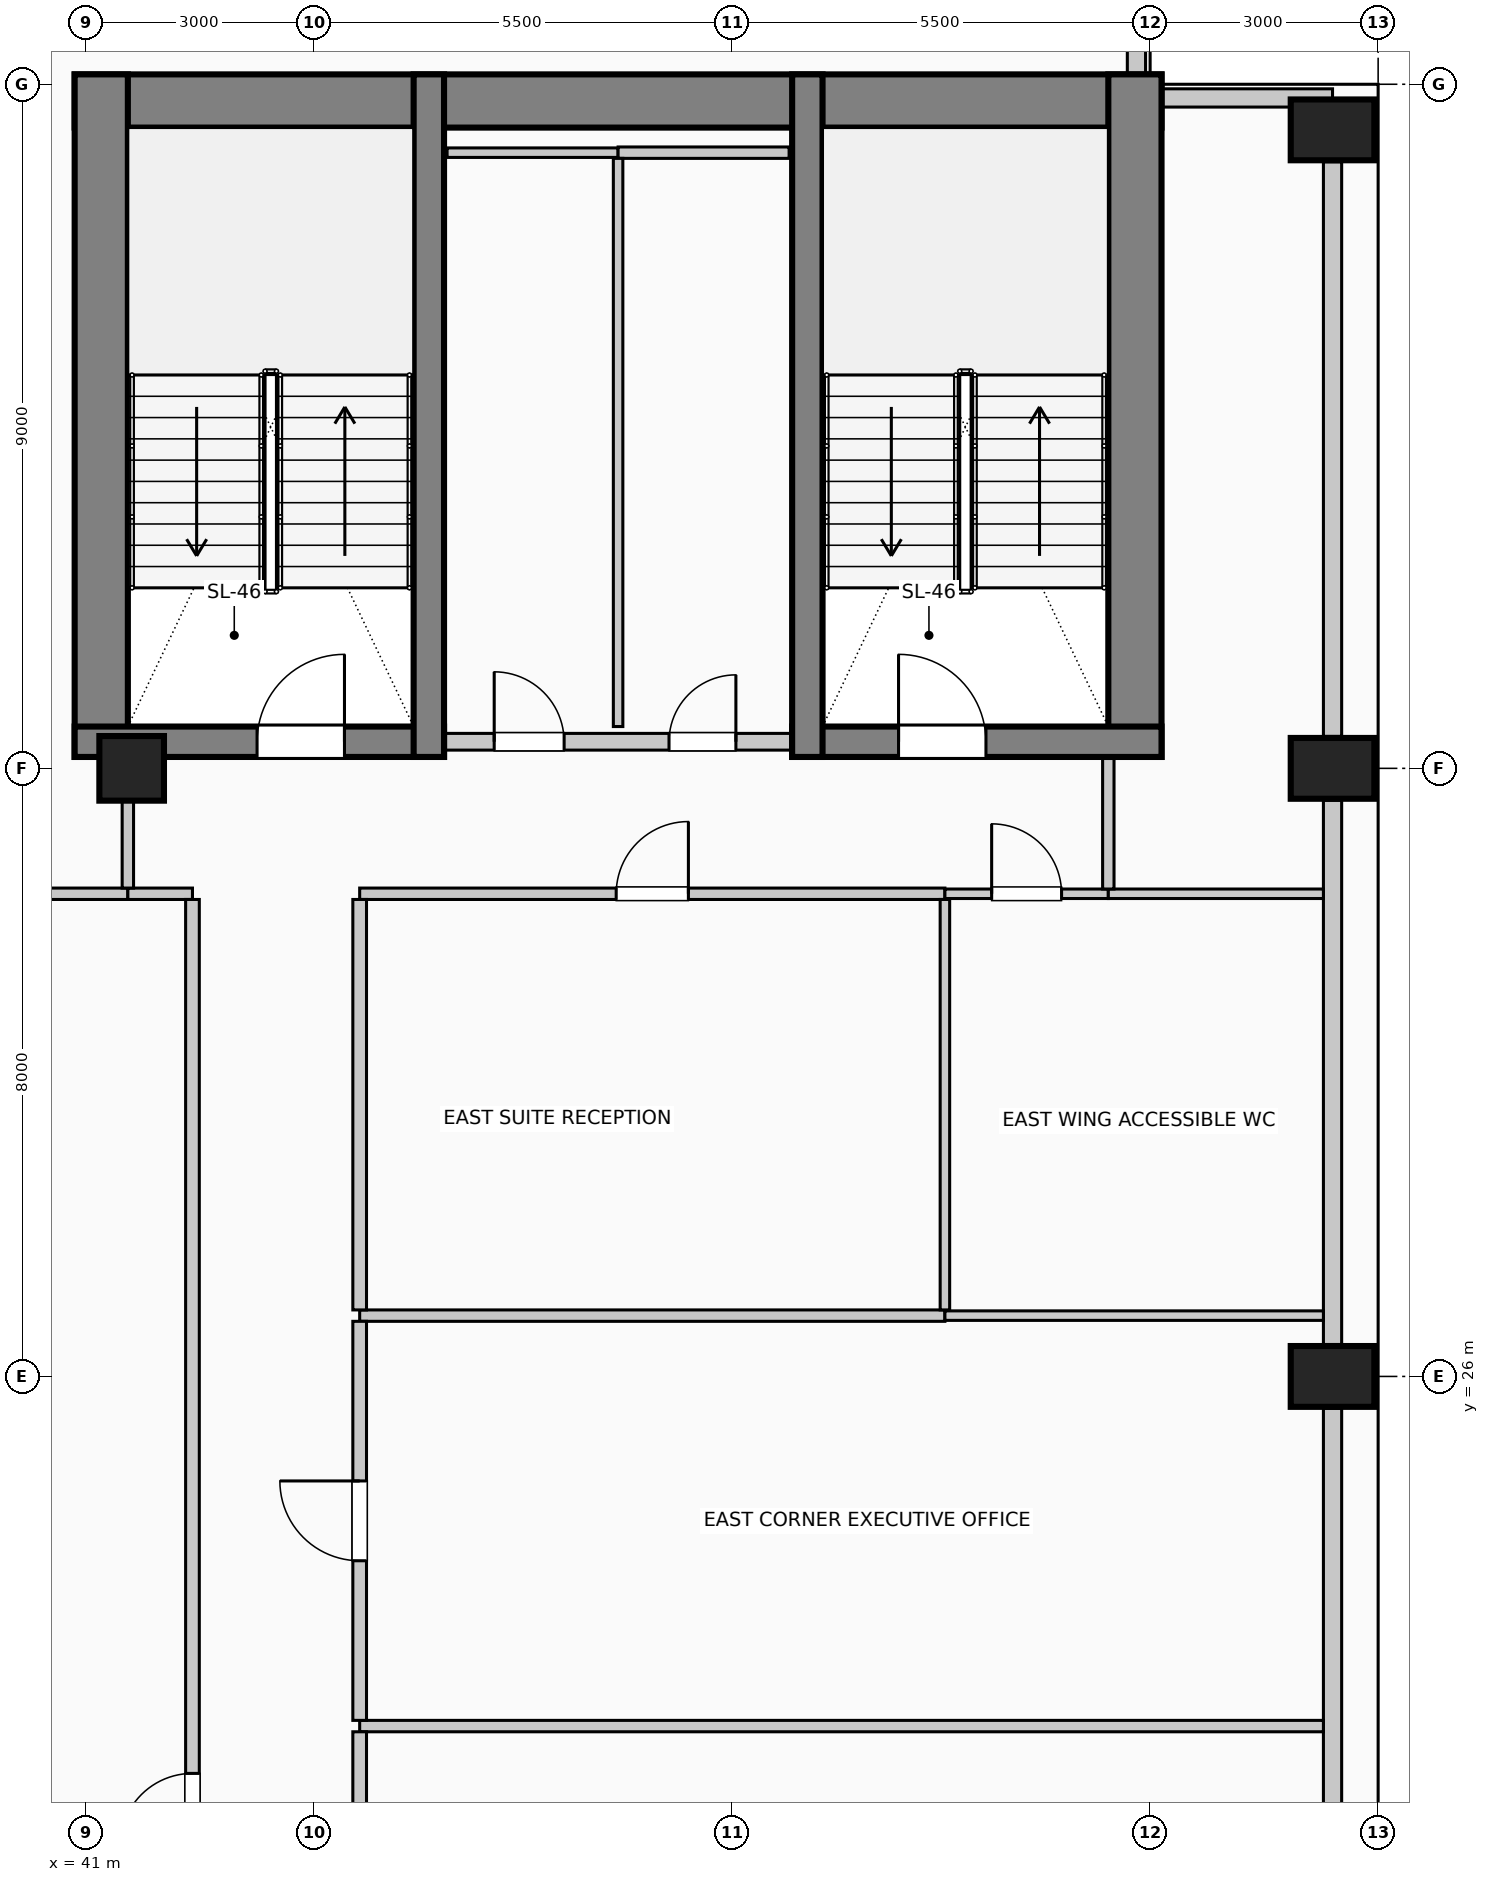
"""IFC4 building model, lengths in metres.
Left out: names, types, materials, properties, quantities, classifications, styles, units other than length and angle.
Written with IfcOpenShell. Run it as: python <this file> out.ifc"""

import sys

from ifc_helpers import new_model, si_unit, direction, frame, frame_2d, origin, origin_2d, place, context, subcontext, project, spatial, rectangle, circle, extrude, element, fill, save


model = new_model("IFC4")
c1 = context("Model", 3, precision=1e-05, world=origin(), true_north=direction((0.0, 1.0)))
c2 = subcontext(c1, "Body", "Model", "MODEL_VIEW")
j1 = project(units=[si_unit("LENGTHUNIT", "METRE"), si_unit("PLANEANGLEUNIT", "RADIAN")], contexts=[c1])
p1 = place(None, origin())
s1 = spatial("IfcSite", under=j1, at=p1, CompositionType="ELEMENT")
p2 = place(p1, origin())
s2 = spatial("IfcBuilding", under=s1, at=p2, CompositionType="ELEMENT")
p3 = place(p2, frame((0.0, 0.0, 182.6)))
s3 = spatial("IfcBuildingStorey", under=s2, at=p3, CompositionType="ELEMENT", Elevation=182.6)
p4 = place(p3, frame((40.85, 42.78, 0.0), z_axis=(0.0, 0.0, 1.0), x_axis=(1.0, 0.0, 0.0)))
e1 = element("IfcWall", 1, at=p4, inside=s3, PredefinedType="SHEAR", context=c2, shape_type="SweptSolid", body=[
    extrude(rectangle(XDim=14.3, YDim=0.7, at=frame_2d((7.15, 0.0))), origin(), (0.0, 0.0, 1.0), 4.0),
])
for number, where, z_axis, x_axis in (
    (2, (41.2, 34.15, 0.0), (0.0, 0.0, 1.0), (0.0, 1.0, 0.0)),
    (3, (54.8, 34.15, 0.0), (0.0, 0.0, 1.0), (0.0, 1.0, 0.0)),
):
    element("IfcWall", number, at=place(p3, frame(where, z_axis=z_axis, x_axis=x_axis)), inside=s3, PredefinedType="SHEAR", context=c2, shape_type="SweptSolid", body=[
        extrude(rectangle(XDim=8.98, YDim=0.7, at=frame_2d((4.49, 0.0))), origin(), (0.0, 0.0, 1.0), 4.0),
    ])
p5 = place(p3, frame((40.85, 34.35, 0.0), z_axis=(0.0, 0.0, 1.0), x_axis=(1.0, 0.0, 0.0)))
e4 = element("IfcWall", 4, at=p5, inside=s3, PredefinedType="SHEAR", context=c2, shape_type="SweptSolid", body=[
    extrude(rectangle(XDim=4.86, YDim=0.4, at=frame_2d((2.43, 0.0))), origin(), (0.0, 0.0, 1.0), 4.0),
])
p6 = place(p5, frame((2.4, 0.0, 0.0)))
e5 = element("IfcOpeningElement", 5, at=p6, cuts=e4, PredefinedType="OPENING", context=c2, shape_type="SweptSolid", body=[
    extrude(rectangle(XDim=1.15, YDim=2.2, at=frame_2d((0.575, 1.1))), frame((0.0, 0.21, 0.0), z_axis=(0.0, -1.0, 0.0), x_axis=(1.0, 0.0, 0.0)), (0.0, 0.0, 1.0), 0.42),
])
p7 = place(p3, frame((45.51, 34.15, 0.0), z_axis=(0.0, 0.0, 1.0), x_axis=(0.0, 1.0, 0.0)))
e6 = element("IfcWall", 6, at=p7, inside=s3, PredefinedType="SHEAR", context=c2, shape_type="SweptSolid", body=[
    extrude(rectangle(XDim=8.98, YDim=0.4, at=frame_2d((4.49, 0.0))), origin(), (0.0, 0.0, 1.0), 4.0),
])
p8 = place(p3, frame((50.29, 34.35, 0.0), z_axis=(0.0, 0.0, 1.0), x_axis=(1.0, 0.0, 0.0)))
e7 = element("IfcWall", 7, at=p8, inside=s3, PredefinedType="SHEAR", context=c2, shape_type="SweptSolid", body=[
    extrude(rectangle(XDim=4.86, YDim=0.4, at=frame_2d((2.43, 0.0))), origin(), (0.0, 0.0, 1.0), 4.0),
])
p9 = place(p8, frame((1.4, 0.0, 0.0)))
e8 = element("IfcOpeningElement", 8, at=p9, cuts=e7, PredefinedType="OPENING", context=c2, shape_type="SweptSolid", body=[
    extrude(rectangle(XDim=1.15, YDim=2.2, at=frame_2d((0.575, 1.1))), frame((0.0, 0.21, 0.0), z_axis=(0.0, -1.0, 0.0), x_axis=(1.0, 0.0, 0.0)), (0.0, 0.0, 1.0), 0.42),
])
p10 = place(p3, frame((50.49, 34.15, 0.0), z_axis=(0.0, 0.0, 1.0), x_axis=(0.0, 1.0, 0.0)))
e9 = element("IfcWall", 9, at=p10, inside=s3, PredefinedType="SHEAR", context=c2, shape_type="SweptSolid", body=[
    extrude(rectangle(XDim=8.98, YDim=0.4, at=frame_2d((4.49, 0.0))), origin(), (0.0, 0.0, 1.0), 4.0),
])
for number, where, z_axis, x_axis in (
    (10, (57.4, 26.0, 0.0), (0.0, 0.0, 1.0), (0.0, 1.0, 0.0)),
    (11, (57.4, 34.0, 0.0), (0.0, 0.0, 1.0), (0.0, 1.0, 0.0)),
    (12, (57.4, 42.4, 0.0), (0.0, 0.0, 1.0), (0.0, 1.0, 0.0)),
):
    element("IfcColumn", number, at=place(p3, frame(where, z_axis=z_axis, x_axis=x_axis)), inside=s3, PredefinedType="COLUMN", context=c2, shape_type="SweptSolid", body=[
        extrude(rectangle(XDim=0.8, YDim=1.1, at=origin_2d()), origin(), (0.0, 0.0, 1.0), 4.0),
    ])
p11 = place(p3, frame((41.6, 34.0, 0.0), z_axis=(0.0, 0.0, 1.0), x_axis=(1.0, 0.0, 0.0)))
e13 = element("IfcColumn", 13, at=p11, inside=s3, PredefinedType="COLUMN", context=c2, shape_type="SweptSolid", body=[
    extrude(circle(Radius=0.425, at=origin_2d()), origin(), (0.0, 0.0, 1.0), 4.0),
])
for number, where, z_axis, x_axis in (
    (14, (57.4, 25.58, 0.0), (0.0, 0.0, 1.0), (0.0, -1.0, 0.0)),
    (15, (57.4, 33.58, 0.0), (0.0, 0.0, 1.0), (0.0, -1.0, 0.0)),
):
    element("IfcWall", number, at=place(p3, frame(where, z_axis=z_axis, x_axis=x_axis)), inside=s3, PredefinedType="SOLIDWALL", context=c2, shape_type="SweptSolid", body=[
        extrude(rectangle(XDim=7.16, YDim=0.24, at=frame_2d((3.58, 0.0))), origin(), (0.0, 0.0, 1.0), 3.0),
    ])
p12 = place(p3, frame((57.4, 41.98, 0.0), z_axis=(0.0, 0.0, 1.0), x_axis=(0.0, -1.0, 0.0)))
e16 = element("IfcWall", 16, at=p12, inside=s3, PredefinedType="SOLIDWALL", context=c2, shape_type="SweptSolid", body=[
    extrude(rectangle(XDim=7.56, YDim=0.24, at=frame_2d((3.78, 0.0))), origin(), (0.0, 0.0, 1.0), 3.0),
])
p13 = place(p3, frame((54.82, 45.4, 0.0), z_axis=(0.0, 0.0, 1.0), x_axis=(0.0, -1.0, 0.0)))
e17 = element("IfcWall", 17, at=p13, inside=s3, PredefinedType="SOLIDWALL", context=c2, shape_type="SweptSolid", body=[
    extrude(rectangle(XDim=2.265, YDim=0.24, at=frame_2d((1.132, 0.0))), origin(), (0.0, 0.0, 1.0), 3.75),
])
p14 = place(p3, frame((55.155, 42.82, 0.0), z_axis=(0.0, 0.0, 1.0), x_axis=(1.0, 0.0, 0.0)))
e18 = element("IfcWall", 18, at=p14, inside=s3, PredefinedType="SOLIDWALL", context=c2, shape_type="SweptSolid", body=[
    extrude(rectangle(XDim=2.245, YDim=0.24, at=frame_2d((1.123, 0.0))), origin(), (0.0, 0.0, 1.0), 3.75),
])
p15 = place(p3, frame((45.72, 34.35, 0.0), z_axis=(0.0, 0.0, 1.0), x_axis=(1.0, 0.0, 0.0)))
e19 = element("IfcWall", 19, at=p15, inside=s3, PredefinedType="PARTITIONING", context=c2, shape_type="SweptSolid", body=[
    extrude(rectangle(XDim=4.56, YDim=0.22, at=frame_2d((2.28, 0.0))), origin(), (0.0, 0.0, 1.0), 3.75),
])
p16 = place(p15, frame((0.65, 0.0, 0.0)))
e20 = element("IfcOpeningElement", 20, at=p16, cuts=e19, PredefinedType="OPENING", context=c2, shape_type="SweptSolid", body=[
    extrude(rectangle(XDim=0.92, YDim=2.1, at=frame_2d((0.46, 1.05))), frame((0.0, 0.12, 0.0), z_axis=(0.0, -1.0, 0.0), x_axis=(1.0, 0.0, 0.0)), (0.0, 0.0, 1.0), 0.24),
])
p17 = place(p15, frame((2.95, 0.0, 0.0)))
e21 = element("IfcOpeningElement", 21, at=p17, cuts=e19, PredefinedType="OPENING", context=c2, shape_type="SweptSolid", body=[
    extrude(rectangle(XDim=0.88, YDim=2.1, at=frame_2d((0.44, 1.05))), frame((0.0, 0.12, 0.0), z_axis=(0.0, -1.0, 0.0), x_axis=(1.0, 0.0, 0.0)), (0.0, 0.0, 1.0), 0.24),
])
p18 = place(p3, frame((44.6, 21.4, 0.0), z_axis=(0.0, 0.0, 1.0), x_axis=(1.0, 0.0, 0.0)))
e22 = element("IfcWall", 22, at=p18, inside=s3, PredefinedType="PARTITIONING", context=c2, shape_type="SweptSolid", body=[
    extrude(rectangle(XDim=12.68, YDim=0.15, at=frame_2d((6.34, 0.0))), origin(), (0.0, 0.0, 1.0), 3.75),
])
p19 = place(p3, frame((44.6, 26.8, 0.0), z_axis=(0.0, 0.0, 1.0), x_axis=(1.0, 0.0, 0.0)))
e23 = element("IfcWall", 23, at=p19, inside=s3, PredefinedType="PARTITIONING", context=c2, shape_type="SweptSolid", body=[
    extrude(rectangle(XDim=7.7, YDim=0.15, at=frame_2d((3.85, 0.0))), origin(), (0.0, 0.0, 1.0), 3.75),
])
p20 = place(p3, frame((52.3, 26.8, 0.0), z_axis=(0.0, 0.0, 1.0), x_axis=(1.0, 0.0, 0.0)))
e24 = element("IfcWall", 24, at=p20, inside=s3, PredefinedType="PARTITIONING", context=c2, shape_type="SweptSolid", body=[
    extrude(rectangle(XDim=4.98, YDim=0.125, at=frame_2d((2.49, 0.0))), origin(), (0.0, 0.0, 1.0), 3.75),
])
p21 = place(p3, frame((34.12, 32.35, 0.0), z_axis=(0.0, 0.0, 1.0), x_axis=(1.0, 0.0, 0.0)))
e25 = element("IfcWall", 25, at=p21, inside=s3, PredefinedType="PARTITIONING", context=c2, shape_type="SweptSolid", body=[
    extrude(rectangle(XDim=7.43, YDim=0.15, at=frame_2d((3.715, 0.0))), origin(), (0.0, 0.0, 1.0), 3.75),
])
p22 = place(p3, frame((41.55, 32.35, 0.0), z_axis=(0.0, 0.0, 1.0), x_axis=(1.0, 0.0, 0.0)))
e26 = element("IfcWall", 26, at=p22, inside=s3, PredefinedType="PARTITIONING", context=c2, shape_type="SweptSolid", body=[
    extrude(rectangle(XDim=0.85, YDim=0.15, at=frame_2d((0.425, 0.0))), origin(), (0.0, 0.0, 1.0), 3.75),
])
p23 = place(p3, frame((44.6, 32.35, 0.0), z_axis=(0.0, 0.0, 1.0), x_axis=(1.0, 0.0, 0.0)))
e27 = element("IfcWall", 27, at=p23, inside=s3, PredefinedType="PARTITIONING", context=c2, shape_type="SweptSolid", body=[
    extrude(rectangle(XDim=7.7, YDim=0.15, at=frame_2d((3.85, 0.0))), origin(), (0.0, 0.0, 1.0), 3.75),
])
p24 = place(p23, frame((3.375, 0.0, 0.0)))
e28 = element("IfcOpeningElement", 28, at=p24, cuts=e27, PredefinedType="OPENING", context=c2, shape_type="SweptSolid", body=[
    extrude(rectangle(XDim=0.95, YDim=2.15, at=frame_2d((0.475, 1.075))), frame((0.0, 0.085, 0.0), z_axis=(0.0, -1.0, 0.0), x_axis=(1.0, 0.0, 0.0)), (0.0, 0.0, 1.0), 0.17),
])
p25 = place(p3, frame((52.3, 32.35, 0.0), z_axis=(0.0, 0.0, 1.0), x_axis=(1.0, 0.0, 0.0)))
e29 = element("IfcWall", 29, at=p25, inside=s3, PredefinedType="PARTITIONING", context=c2, shape_type="SweptSolid", body=[
    extrude(rectangle(XDim=2.15, YDim=0.125, at=frame_2d((1.075, 0.0))), origin(), (0.0, 0.0, 1.0), 3.75),
])
p26 = place(p25, frame((0.615, 0.0, 0.0)))
e30 = element("IfcOpeningElement", 30, at=p26, cuts=e29, PredefinedType="OPENING", context=c2, shape_type="SweptSolid", body=[
    extrude(rectangle(XDim=0.92, YDim=2.1, at=frame_2d((0.46, 1.05))), frame((0.0, 0.073, 0.0), z_axis=(0.0, -1.0, 0.0), x_axis=(1.0, 0.0, 0.0)), (0.0, 0.0, 1.0), 0.145),
])
p27 = place(p3, frame((54.45, 32.35, 0.0), z_axis=(0.0, 0.0, 1.0), x_axis=(1.0, 0.0, 0.0)))
e31 = element("IfcWall", 31, at=p27, inside=s3, PredefinedType="PARTITIONING", context=c2, shape_type="SweptSolid", body=[
    extrude(rectangle(XDim=2.83, YDim=0.125, at=frame_2d((1.415, 0.0))), origin(), (0.0, 0.0, 1.0), 3.75),
])
p28 = place(p3, frame((45.75, 42.1, 0.0), z_axis=(0.0, 0.0, 1.0), x_axis=(1.0, 0.0, 0.0)))
e32 = element("IfcWall", 32, at=p28, inside=s3, PredefinedType="PARTITIONING", context=c2, shape_type="SweptSolid", body=[
    extrude(rectangle(XDim=2.25, YDim=0.125, at=frame_2d((1.125, 0.0))), origin(), (0.0, 0.0, 1.0), 3.75),
])
p29 = place(p3, frame((48.0, 42.1, 0.0), z_axis=(0.0, 0.0, 1.0), x_axis=(1.0, 0.0, 0.0)))
e33 = element("IfcWall", 33, at=p29, inside=s3, PredefinedType="PARTITIONING", context=c2, shape_type="SweptSolid", body=[
    extrude(rectangle(XDim=2.25, YDim=0.15, at=frame_2d((1.125, 0.0))), origin(), (0.0, 0.0, 1.0), 3.75),
])
p30 = place(p3, frame((41.55, 32.425, 0.0), z_axis=(0.0, 0.0, 1.0), x_axis=(0.0, 1.0, 0.0)))
e34 = element("IfcWall", 34, at=p30, inside=s3, PredefinedType="PARTITIONING", context=c2, shape_type="SweptSolid", body=[
    extrude(rectangle(XDim=1.15, YDim=0.15, at=frame_2d((0.575, 0.0))), origin(), (0.0, 0.0, 1.0), 3.145),
])
p31 = place(p3, frame((42.4, 6.89, 0.0), z_axis=(0.0, 0.0, 1.0), x_axis=(0.0, 1.0, 0.0)))
e35 = element("IfcWall", 35, at=p31, inside=s3, PredefinedType="PARTITIONING", context=c2, shape_type="SweptSolid", body=[
    extrude(rectangle(XDim=25.385, YDim=0.18, at=frame_2d((12.692, 0.0))), origin(), (0.0, 0.0, 1.0), 3.75),
])
p32 = place(p31, frame((12.938, 0.0, 0.0)))
e36 = element("IfcOpeningElement", 36, at=p32, cuts=e35, PredefinedType="OPENING", context=c2, shape_type="SweptSolid", body=[
    extrude(rectangle(XDim=0.95, YDim=2.15, at=frame_2d((0.475, 1.075))), frame((0.0, 0.1, 0.0), z_axis=(0.0, -1.0, 0.0), x_axis=(1.0, 0.0, 0.0)), (0.0, 0.0, 1.0), 0.2),
])
p33 = place(p3, frame((44.6, 16.075, 0.0), z_axis=(0.0, 0.0, 1.0), x_axis=(0.0, 1.0, 0.0)))
e37 = element("IfcWall", 37, at=p33, inside=s3, PredefinedType="PARTITIONING", context=c2, shape_type="SweptSolid", body=[
    extrude(rectangle(XDim=5.25, YDim=0.18, at=frame_2d((2.625, 0.0))), origin(), (0.0, 0.0, 1.0), 3.75),
])
p34 = place(p33, frame((2.15, 0.0, 0.0)))
e38 = element("IfcOpeningElement", 38, at=p34, cuts=e37, PredefinedType="OPENING", context=c2, shape_type="SweptSolid", body=[
    extrude(rectangle(XDim=0.95, YDim=2.15, at=frame_2d((0.475, 1.075))), frame((0.0, 0.1, 0.0), z_axis=(0.0, -1.0, 0.0), x_axis=(1.0, 0.0, 0.0)), (0.0, 0.0, 1.0), 0.2),
])
p35 = place(p3, frame((44.6, 21.475, 0.0), z_axis=(0.0, 0.0, 1.0), x_axis=(0.0, 1.0, 0.0)))
e39 = element("IfcWall", 39, at=p35, inside=s3, PredefinedType="PARTITIONING", context=c2, shape_type="SweptSolid", body=[
    extrude(rectangle(XDim=5.25, YDim=0.18, at=frame_2d((2.625, 0.0))), origin(), (0.0, 0.0, 1.0), 3.75),
])
p36 = place(p35, frame((2.1, 0.0, 0.0)))
e40 = element("IfcOpeningElement", 40, at=p36, cuts=e39, PredefinedType="OPENING", context=c2, shape_type="SweptSolid", body=[
    extrude(rectangle(XDim=1.05, YDim=2.15, at=frame_2d((0.525, 1.075))), frame((0.0, 0.1, 0.0), z_axis=(0.0, -1.0, 0.0), x_axis=(1.0, 0.0, 0.0)), (0.0, 0.0, 1.0), 0.2),
])
p37 = place(p3, frame((44.6, 26.875, 0.0), z_axis=(0.0, 0.0, 1.0), x_axis=(0.0, 1.0, 0.0)))
e41 = element("IfcWall", 41, at=p37, inside=s3, PredefinedType="PARTITIONING", context=c2, shape_type="SweptSolid", body=[
    extrude(rectangle(XDim=5.4, YDim=0.18, at=frame_2d((2.7, 0.0))), origin(), (0.0, 0.0, 1.0), 3.75),
])
p38 = place(p3, frame((48.0, 34.55, 0.0), z_axis=(0.0, 0.0, 1.0), x_axis=(0.0, 1.0, 0.0)))
e42 = element("IfcWall", 42, at=p38, inside=s3, PredefinedType="PARTITIONING", context=c2, shape_type="SweptSolid", body=[
    extrude(rectangle(XDim=7.475, YDim=0.125, at=frame_2d((3.737, 0.0))), origin(), (0.0, 0.0, 1.0), 3.75),
])
p39 = place(p3, frame((52.3, 26.875, 0.0), z_axis=(0.0, 0.0, 1.0), x_axis=(0.0, 1.0, 0.0)))
e43 = element("IfcWall", 43, at=p39, inside=s3, PredefinedType="PARTITIONING", context=c2, shape_type="SweptSolid", body=[
    extrude(rectangle(XDim=5.4, YDim=0.125, at=frame_2d((2.7, 0.0))), origin(), (0.0, 0.0, 1.0), 3.75),
])
p40 = place(p3, frame((54.45, 32.413, 0.0), z_axis=(0.0, 0.0, 1.0), x_axis=(0.0, 1.0, 0.0)))
e44 = element("IfcWall", 44, at=p40, inside=s3, PredefinedType="PARTITIONING", context=c2, shape_type="SweptSolid", body=[
    extrude(rectangle(XDim=1.737, YDim=0.15, at=frame_2d((0.869, 0.0))), origin(), (0.0, 0.0, 1.0), 3.75),
])
p41 = place(p6, origin())
e45 = element("IfcDoor", 45, at=p41, inside=s3, OperationType="SINGLE_SWING_RIGHT", PredefinedType="DOOR", context=c2, shape_type="SweptSolid", body=[
    extrude(rectangle(XDim=1.15, YDim=2.2, at=frame_2d((0.575, 1.1))), frame((0.0, 0.025, 0.0), z_axis=(0.0, -1.0, 0.0), x_axis=(1.0, 0.0, 0.0)), (0.0, 0.0, 1.0), 0.05),
])
fill(e5, e45)
p42 = place(p16, origin())
e46 = element("IfcDoor", 46, at=p42, inside=s3, OperationType="SINGLE_SWING_LEFT", PredefinedType="DOOR", context=c2, shape_type="SweptSolid", body=[
    extrude(rectangle(XDim=0.92, YDim=2.1, at=frame_2d((0.46, 1.05))), frame((0.0, 0.025, 0.0), z_axis=(0.0, -1.0, 0.0), x_axis=(1.0, 0.0, 0.0)), (0.0, 0.0, 1.0), 0.05),
])
fill(e20, e46)
p43 = place(p17, origin())
e47 = element("IfcDoor", 47, at=p43, inside=s3, OperationType="SINGLE_SWING_RIGHT", PredefinedType="DOOR", context=c2, shape_type="SweptSolid", body=[
    extrude(rectangle(XDim=0.88, YDim=2.1, at=frame_2d((0.44, 1.05))), frame((0.0, 0.025, 0.0), z_axis=(0.0, -1.0, 0.0), x_axis=(1.0, 0.0, 0.0)), (0.0, 0.0, 1.0), 0.05),
])
fill(e21, e47)
p44 = place(p9, origin())
e48 = element("IfcDoor", 48, at=p44, inside=s3, OperationType="SINGLE_SWING_LEFT", PredefinedType="DOOR", context=c2, shape_type="SweptSolid", body=[
    extrude(rectangle(XDim=1.15, YDim=2.2, at=frame_2d((0.575, 1.1))), frame((0.0, 0.025, 0.0), z_axis=(0.0, -1.0, 0.0), x_axis=(1.0, 0.0, 0.0)), (0.0, 0.0, 1.0), 0.05),
])
fill(e8, e48)
p45 = place(p24, origin())
e49 = element("IfcDoor", 49, at=p45, inside=s3, OperationType="SINGLE_SWING_RIGHT", PredefinedType="DOOR", context=c2, shape_type="SweptSolid", body=[
    extrude(rectangle(XDim=0.95, YDim=2.15, at=frame_2d((0.475, 1.075))), frame((0.0, 0.025, 0.0), z_axis=(0.0, -1.0, 0.0), x_axis=(1.0, 0.0, 0.0)), (0.0, 0.0, 1.0), 0.05),
])
fill(e28, e49)
p46 = place(p26, origin())
e50 = element("IfcDoor", 50, at=p46, inside=s3, OperationType="SINGLE_SWING_LEFT", PredefinedType="DOOR", context=c2, shape_type="SweptSolid", body=[
    extrude(rectangle(XDim=0.92, YDim=2.1, at=frame_2d((0.46, 1.05))), frame((0.0, 0.025, 0.0), z_axis=(0.0, -1.0, 0.0), x_axis=(1.0, 0.0, 0.0)), (0.0, 0.0, 1.0), 0.05),
])
fill(e30, e50)
p47 = place(p32, origin())
e51 = element("IfcDoor", 51, at=p47, inside=s3, OperationType="SINGLE_SWING_LEFT", PredefinedType="DOOR", context=c2, shape_type="SweptSolid", body=[
    extrude(rectangle(XDim=0.95, YDim=2.15, at=frame_2d((0.475, 1.075))), frame((0.0, 0.025, 0.0), z_axis=(0.0, -1.0, 0.0), x_axis=(1.0, 0.0, 0.0)), (0.0, 0.0, 1.0), 0.05),
])
fill(e36, e51)
p48 = place(p36, origin())
e52 = element("IfcDoor", 52, at=p48, inside=s3, OperationType="SINGLE_SWING_RIGHT", PredefinedType="DOOR", context=c2, shape_type="SweptSolid", body=[
    extrude(rectangle(XDim=1.05, YDim=2.15, at=frame_2d((0.525, 1.075))), frame((0.0, 0.025, 0.0), z_axis=(0.0, -1.0, 0.0), x_axis=(1.0, 0.0, 0.0)), (0.0, 0.0, 1.0), 0.05),
])
fill(e40, e52)
save(model, sys.argv[1])
